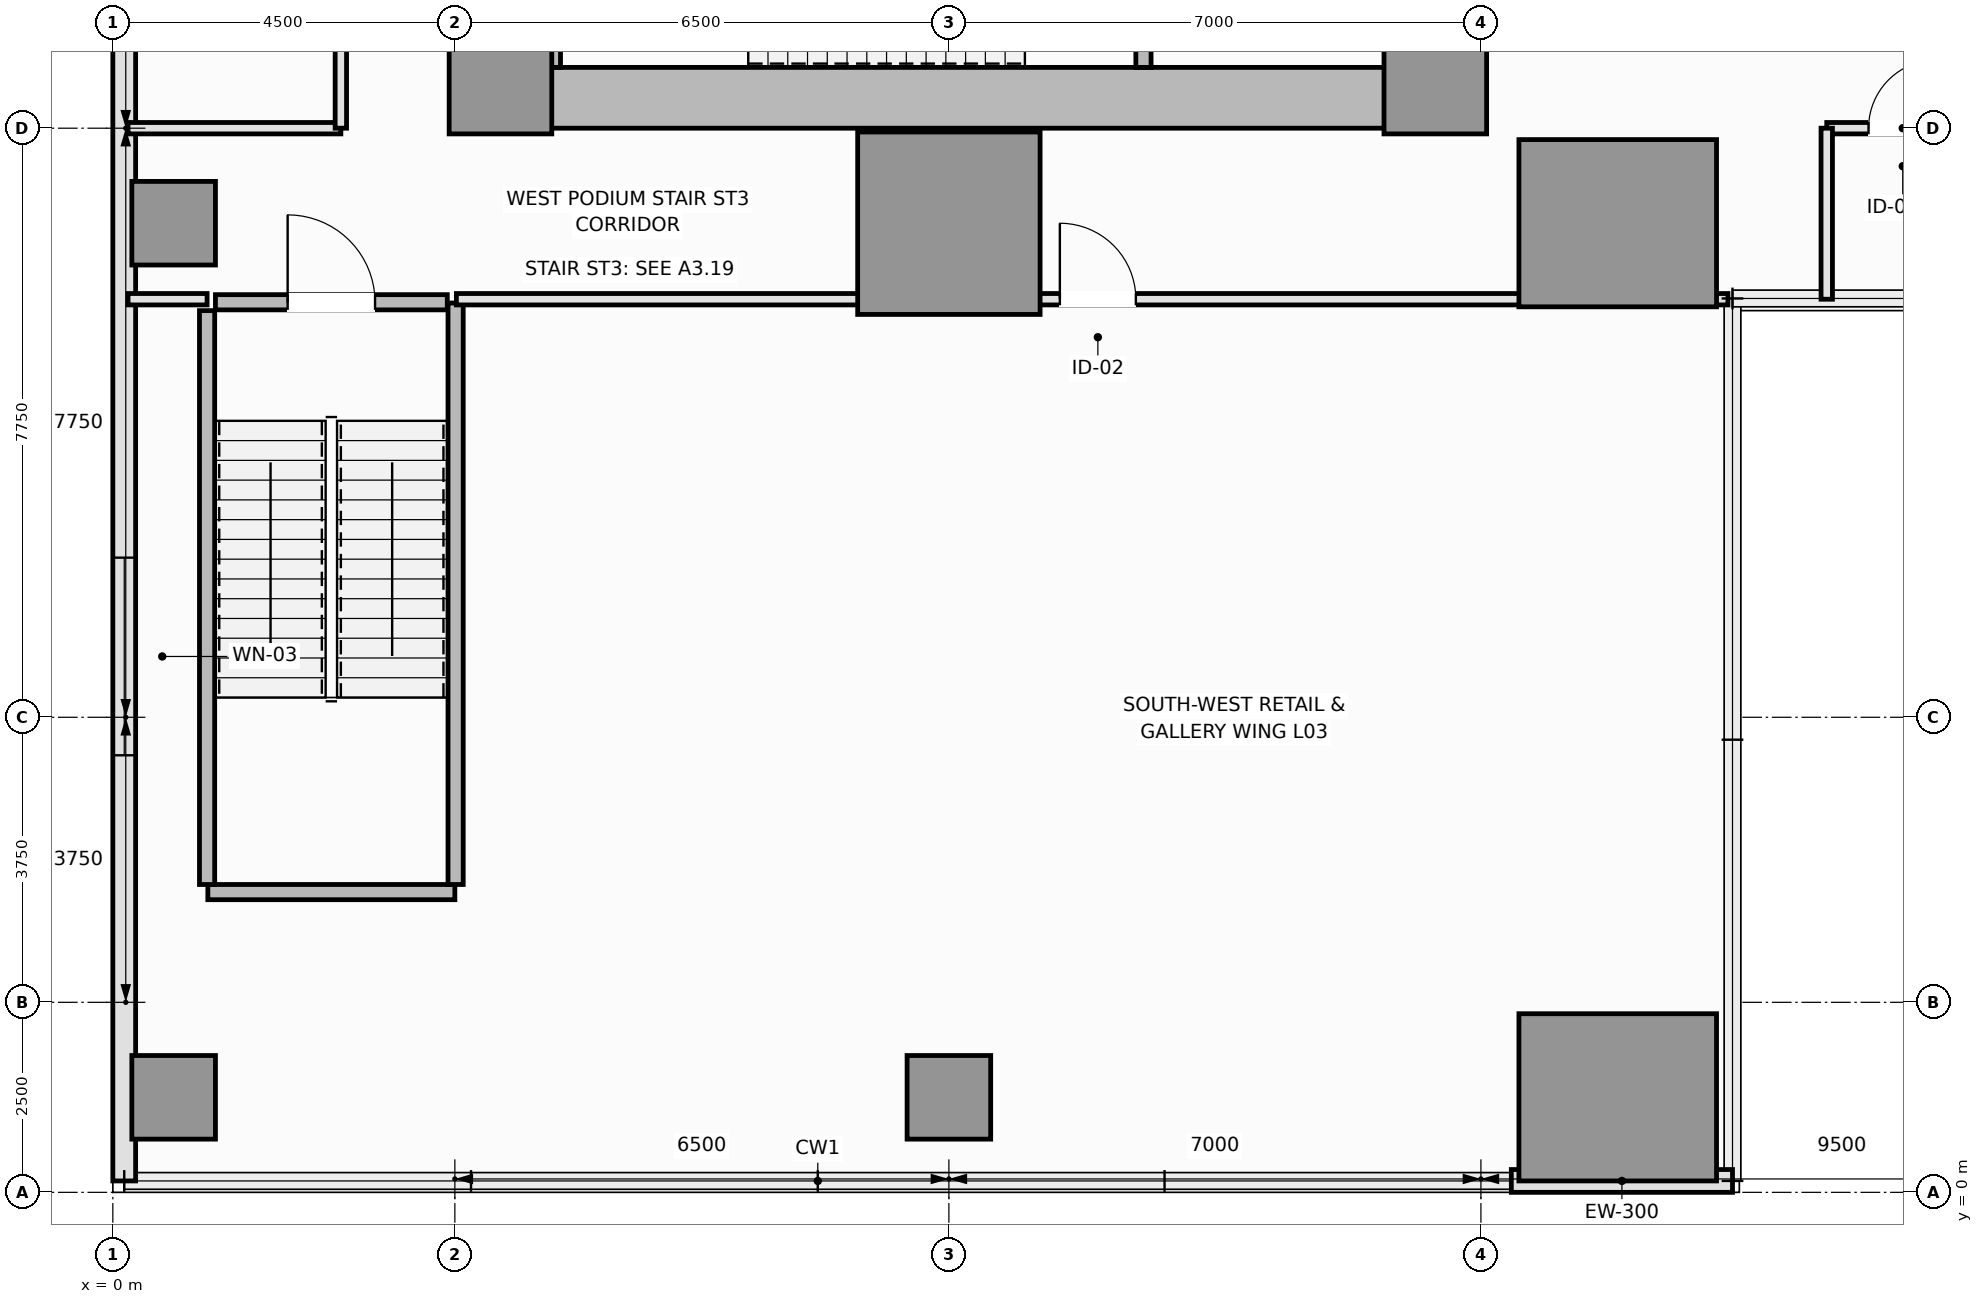
"""IFC4 building model, lengths in metres.
Left out: names, types, materials, properties, quantities, classifications, styles, units other than length and angle.
Written with IfcOpenShell. Run it as: python <this file> out.ifc"""

import sys

from ifc_helpers import new_model, si_unit, direction, frame, frame_2d, origin, origin_2d, place, context, subcontext, project, spatial, rectangle, extrude, element, fill, save


model = new_model("IFC4")
c1 = context("Model", 3, precision=1e-05, world=origin(), true_north=direction((0.0, 1.0)))
c2 = subcontext(c1, "Body", "Model", "MODEL_VIEW")
j1 = project(units=[si_unit("LENGTHUNIT", "METRE"), si_unit("PLANEANGLEUNIT", "RADIAN")], contexts=[c1])
p1 = place(None, origin())
s1 = spatial("IfcSite", under=j1, at=p1, CompositionType="ELEMENT")
p2 = place(p1, origin())
s2 = spatial("IfcBuilding", under=s1, at=p2, CompositionType="ELEMENT")
p3 = place(p2, frame((0.0, 0.0, 15.6)))
s3 = spatial("IfcBuildingStorey", under=s2, at=p3, CompositionType="ELEMENT", Elevation=15.6)
p4 = place(p3, frame((4.5, 14.4, 0.0), z_axis=(0.0, 0.0, 1.0), x_axis=(1.0, 0.0, 0.0)))
e1 = element("IfcWall", 1, at=p4, inside=s3, PredefinedType="SHEAR", context=c2, shape_type="SweptSolid", body=[
    extrude(rectangle(XDim=13.5, YDim=0.8, at=frame_2d((6.75, 0.0))), origin(), (0.0, 0.0, 1.0), 4.8),
])
p5 = place(p3, frame((4.9, 14.8, 0.0), z_axis=(0.0, 0.0, 1.0), x_axis=(0.0, 1.0, 0.0)))
e2 = element("IfcWall", 2, at=p5, inside=s3, PredefinedType="SHEAR", context=c2, shape_type="SweptSolid", body=[
    extrude(rectangle(XDim=20.9, YDim=0.8, at=frame_2d((10.45, 0.0))), origin(), (0.0, 0.0, 1.0), 4.8),
])
p6 = place(p3, frame((17.6, 14.8, 0.0), z_axis=(0.0, 0.0, 1.0), x_axis=(0.0, 1.0, 0.0)))
e3 = element("IfcWall", 3, at=p6, inside=s3, PredefinedType="SHEAR", context=c2, shape_type="SweptSolid", body=[
    extrude(rectangle(XDim=8.65, YDim=0.8, at=frame_2d((4.325, 0.0))), origin(), (0.0, 0.0, 1.0), 4.8),
])
p7 = place(p6, frame((4.1, 0.0, 0.0)))
e4 = element("IfcOpeningElement", 4, at=p7, cuts=e3, PredefinedType="OPENING", context=c2, shape_type="SweptSolid", body=[
    extrude(rectangle(XDim=1.1, YDim=2.15, at=frame_2d((0.55, 1.075))), frame((0.0, 0.41, 0.0), z_axis=(0.0, -1.0, 0.0), x_axis=(1.0, 0.0, 0.0)), (0.0, 0.0, 1.0), 0.82),
])
for number, where, z_axis, x_axis in (
    (5, (5.1, 14.6, 0.0), (0.0, 0.0, 1.0), (1.0, 0.0, 0.0)),
    (6, (17.4, 14.6, 0.0), (0.0, 0.0, 1.0), (1.0, 0.0, 0.0)),
):
    element("IfcColumn", number, at=place(p3, frame(where, z_axis=z_axis, x_axis=x_axis)), inside=s3, PredefinedType="PILASTER", context=c2, shape_type="SweptSolid", body=[
        extrude(rectangle(XDim=1.35, YDim=1.35, at=origin_2d()), origin(), (0.0, 0.0, 1.0), 4.8),
    ])
p8 = place(p3, frame((11.0, 12.75, 0.0), z_axis=(0.0, 0.0, 1.0), x_axis=(1.0, 0.0, 0.0)))
e7 = element("IfcColumn", 7, at=p8, inside=s3, PredefinedType="COLUMN", context=c2, shape_type="SweptSolid", body=[
    extrude(rectangle(XDim=2.4, YDim=2.4, at=origin_2d()), origin(), (0.0, 0.0, 1.0), 4.8),
])
for number, where, z_axis, x_axis in (
    (8, (19.8, 1.25, 0.0), (0.0, 0.0, 1.0), (1.0, 0.0, 0.0)),
    (9, (19.8, 12.75, 0.0), (0.0, 0.0, 1.0), (1.0, 0.0, 0.0)),
):
    element("IfcColumn", number, at=place(p3, frame(where, z_axis=z_axis, x_axis=x_axis)), inside=s3, PredefinedType="COLUMN", context=c2, shape_type="SweptSolid", body=[
        extrude(rectangle(XDim=2.6, YDim=2.2, at=origin_2d()), origin(), (0.0, 0.0, 1.0), 4.8),
    ])
for number, where, z_axis, x_axis in (
    (10, (0.8, 1.25, 0.0), (0.0, 0.0, 1.0), (1.0, 0.0, 0.0)),
    (11, (0.8, 12.75, 0.0), (0.0, 0.0, 1.0), (1.0, 0.0, 0.0)),
    (12, (11.0, 1.25, 0.0), (0.0, 0.0, 1.0), (1.0, 0.0, 0.0)),
):
    element("IfcColumn", number, at=place(p3, frame(where, z_axis=z_axis, x_axis=x_axis)), inside=s3, PredefinedType="COLUMN", context=c2, shape_type="SweptSolid", body=[
        extrude(rectangle(XDim=1.1, YDim=1.1, at=origin_2d()), origin(), (0.0, 0.0, 1.0), 4.8),
    ])
p9 = place(p3, frame((0.15, 50.35, 0.0), z_axis=(0.0, 0.0, 1.0), x_axis=(0.0, -1.0, 0.0)))
e13 = element("IfcWall", 13, at=p9, inside=s3, PredefinedType="SOLIDWALL", context=c2, shape_type="SweptSolid", body=[
    extrude(rectangle(XDim=50.2, YDim=0.3, at=frame_2d((25.1, 0.0))), origin(), (0.0, 0.0, 1.0), 4.6),
])
p10 = place(p9, frame((6.5, 0.0, 0.9)))
e14 = element("IfcOpeningElement", 14, at=p10, cuts=e13, PredefinedType="OPENING", context=c2, shape_type="SweptSolid", body=[
    extrude(rectangle(XDim=2.6, YDim=2.2, at=frame_2d((1.3, 1.1))), frame((0.0, 0.16, 0.0), z_axis=(0.0, -1.0, 0.0), x_axis=(1.0, 0.0, 0.0)), (0.0, 0.0, 1.0), 0.32),
])
p11 = place(p9, frame((42.0, 0.0, 0.9)))
e15 = element("IfcOpeningElement", 15, at=p11, cuts=e13, PredefinedType="OPENING", context=c2, shape_type="SweptSolid", body=[
    extrude(rectangle(XDim=2.6, YDim=2.2, at=frame_2d((1.3, 1.1))), frame((0.0, 0.16, 0.0), z_axis=(0.0, -1.0, 0.0), x_axis=(1.0, 0.0, 0.0)), (0.0, 0.0, 1.0), 0.32),
])
p12 = place(p3, frame((18.4, 0.15, 0.0), z_axis=(0.0, 0.0, 1.0), x_axis=(1.0, 0.0, 0.0)))
e16 = element("IfcWall", 16, at=p12, inside=s3, PredefinedType="SOLIDWALL", context=c2, shape_type="SweptSolid", body=[
    extrude(rectangle(XDim=2.91, YDim=0.3, at=frame_2d((1.455, 0.0))), origin(), (0.0, 0.0, 1.0), 4.6),
])
p13 = place(p3, frame((5.79, 14.8, 0.0), z_axis=(0.0, 0.0, 1.0), x_axis=(0.0, 1.0, 0.0)))
e17 = element("IfcWall", 17, at=p13, inside=s3, PredefinedType="SOLIDWALL", context=c2, shape_type="SweptSolid", body=[
    extrude(rectangle(XDim=3.05, YDim=0.2, at=frame_2d((1.525, 0.0))), origin(), (0.0, 0.0, 1.0), 4.8),
])
p14 = place(p3, frame((13.56, 14.8, 0.0), z_axis=(0.0, 0.0, 1.0), x_axis=(0.0, 1.0, 0.0)))
e18 = element("IfcWall", 18, at=p14, inside=s3, PredefinedType="SOLIDWALL", context=c2, shape_type="SweptSolid", body=[
    extrude(rectangle(XDim=3.05, YDim=0.2, at=frame_2d((1.525, 0.0))), origin(), (0.0, 0.0, 1.0), 4.8),
])
p15 = place(p14, frame((0.95, 0.0, 0.0)))
e19 = element("IfcOpeningElement", 19, at=p15, cuts=e18, PredefinedType="OPENING", context=c2, shape_type="SweptSolid", body=[
    extrude(rectangle(XDim=1.15, YDim=2.15, at=frame_2d((0.575, 1.075))), frame((0.0, 0.11, 0.0), z_axis=(0.0, -1.0, 0.0), x_axis=(1.0, 0.0, 0.0)), (0.0, 0.0, 1.0), 0.22),
])
p16 = place(p3, frame((1.25, 3.95, 0.0), z_axis=(0.0, 0.0, 1.0), x_axis=(1.0, 0.0, 0.0)))
e20 = element("IfcWall", 20, at=p16, inside=s3, PredefinedType="SOLIDWALL", context=c2, shape_type="SweptSolid", body=[
    extrude(rectangle(XDim=3.25, YDim=0.2, at=frame_2d((1.625, 0.0))), origin(), (0.0, 0.0, 1.0), 4.8),
])
p17 = place(p3, frame((1.24, 4.05, 0.0), z_axis=(0.0, 0.0, 1.0), x_axis=(0.0, 1.0, 0.0)))
e21 = element("IfcWall", 21, at=p17, inside=s3, PredefinedType="SOLIDWALL", context=c2, shape_type="SweptSolid", body=[
    extrude(rectangle(XDim=7.55, YDim=0.2, at=frame_2d((3.775, 0.0))), origin(), (0.0, 0.0, 1.0), 4.8),
])
p18 = place(p3, frame((4.51, 4.05, 0.0), z_axis=(0.0, 0.0, 1.0), x_axis=(0.0, 1.0, 0.0)))
e22 = element("IfcWall", 22, at=p18, inside=s3, PredefinedType="SOLIDWALL", context=c2, shape_type="SweptSolid", body=[
    extrude(rectangle(XDim=7.65, YDim=0.2, at=frame_2d((3.825, 0.0))), origin(), (0.0, 0.0, 1.0), 4.8),
])
p19 = place(p3, frame((1.35, 11.71, 0.0), z_axis=(0.0, 0.0, 1.0), x_axis=(1.0, 0.0, 0.0)))
e23 = element("IfcWall", 23, at=p19, inside=s3, PredefinedType="SOLIDWALL", context=c2, shape_type="SweptSolid", body=[
    extrude(rectangle(XDim=3.05, YDim=0.2, at=frame_2d((1.525, 0.0))), origin(), (0.0, 0.0, 1.0), 4.8),
])
p20 = place(p19, frame((0.95, 0.0, 0.0)))
e24 = element("IfcOpeningElement", 24, at=p20, cuts=e23, PredefinedType="OPENING", context=c2, shape_type="SweptSolid", body=[
    extrude(rectangle(XDim=1.15, YDim=2.15, at=frame_2d((0.575, 1.075))), frame((0.0, 0.11, 0.0), z_axis=(0.0, -1.0, 0.0), x_axis=(1.0, 0.0, 0.0)), (0.0, 0.0, 1.0), 0.22),
])
p21 = place(p3, frame((22.55, 14.0, 0.0), z_axis=(0.0, 0.0, 1.0), x_axis=(1.0, 0.0, 0.0)))
e25 = element("IfcWall", 25, at=p21, inside=s3, PredefinedType="PARTITIONING", context=c2, shape_type="SweptSolid", body=[
    extrude(rectangle(XDim=2.0, YDim=0.15, at=frame_2d((1.0, 0.0))), origin(), (0.0, 0.0, 1.0), 4.6),
])
p22 = place(p21, frame((0.55, 0.0, 0.0)))
e26 = element("IfcOpeningElement", 26, at=p22, cuts=e25, PredefinedType="OPENING", context=c2, shape_type="SweptSolid", body=[
    extrude(rectangle(XDim=0.9, YDim=2.1, at=frame_2d((0.45, 1.05))), frame((0.0, 0.085, 0.0), z_axis=(0.0, -1.0, 0.0), x_axis=(1.0, 0.0, 0.0)), (0.0, 0.0, 1.0), 0.17),
])
p23 = place(p3, frame((0.2, 11.75, 0.0), z_axis=(0.0, 0.0, 1.0), x_axis=(1.0, 0.0, 0.0)))
e27 = element("IfcWall", 27, at=p23, inside=s3, PredefinedType="PARTITIONING", context=c2, shape_type="SweptSolid", body=[
    extrude(rectangle(XDim=1.04, YDim=0.15, at=frame_2d((0.52, 0.0))), origin(), (0.0, 0.0, 1.0), 4.6),
])
p24 = place(p3, frame((4.52, 11.75, 0.0), z_axis=(0.0, 0.0, 1.0), x_axis=(1.0, 0.0, 0.0)))
e28 = element("IfcWall", 28, at=p24, inside=s3, PredefinedType="PARTITIONING", context=c2, shape_type="SweptSolid", body=[
    extrude(rectangle(XDim=16.73, YDim=0.15, at=frame_2d((8.365, 0.0))), origin(), (0.0, 0.0, 1.0), 4.6),
])
p25 = place(p24, frame((7.94, 0.0, 0.0)))
e29 = element("IfcOpeningElement", 29, at=p25, cuts=e28, PredefinedType="OPENING", context=c2, shape_type="SweptSolid", body=[
    extrude(rectangle(XDim=1.0, YDim=2.15, at=frame_2d((0.5, 1.075))), frame((0.0, 0.085, 0.0), z_axis=(0.0, -1.0, 0.0), x_axis=(1.0, 0.0, 0.0)), (0.0, 0.0, 1.0), 0.17),
])
p26 = place(p3, frame((0.2, 14.0, 0.0), z_axis=(0.0, 0.0, 1.0), x_axis=(1.0, 0.0, 0.0)))
e30 = element("IfcWall", 30, at=p26, inside=s3, PredefinedType="PARTITIONING", context=c2, shape_type="SweptSolid", body=[
    extrude(rectangle(XDim=2.8, YDim=0.15, at=frame_2d((1.4, 0.0))), origin(), (0.0, 0.0, 1.0), 4.6),
])
p27 = place(p3, frame((22.55, 11.75, 0.0), z_axis=(0.0, 0.0, 1.0), x_axis=(0.0, 1.0, 0.0)))
e31 = element("IfcWall", 31, at=p27, inside=s3, PredefinedType="PARTITIONING", context=c2, shape_type="SweptSolid", body=[
    extrude(rectangle(XDim=2.25, YDim=0.15, at=frame_2d((1.125, 0.0))), origin(), (0.0, 0.0, 1.0), 4.6),
])
p28 = place(p3, frame((3.0, 14.0, 0.0), z_axis=(0.0, 0.0, 1.0), x_axis=(0.0, 1.0, 0.0)))
e32 = element("IfcWall", 32, at=p28, inside=s3, PredefinedType="PARTITIONING", context=c2, shape_type="SweptSolid", body=[
    extrude(rectangle(XDim=11.25, YDim=0.15, at=frame_2d((5.625, 0.0))), origin(), (0.0, 0.0, 1.0), 4.6),
])
p29 = place(p28, frame((5.125, 0.0, 0.0)))
e33 = element("IfcOpeningElement", 33, at=p29, cuts=e32, PredefinedType="OPENING", context=c2, shape_type="SweptSolid", body=[
    extrude(rectangle(XDim=1.0, YDim=2.15, at=frame_2d((0.5, 1.075))), frame((0.0, 0.085, 0.0), z_axis=(0.0, -1.0, 0.0), x_axis=(1.0, 0.0, 0.0)), (0.0, 0.0, 1.0), 0.17),
])
p30 = place(p11, origin())
e34 = element("IfcWindow", 34, at=p30, inside=s3, PartitioningType="SINGLE_PANEL", PredefinedType="WINDOW", context=c2, shape_type="SweptSolid", body=[
    extrude(rectangle(XDim=2.6, YDim=2.2, at=frame_2d((1.3, 1.1))), frame((0.0, 0.03, 0.0), z_axis=(0.0, -1.0, 0.0), x_axis=(1.0, 0.0, 0.0)), (0.0, 0.0, 1.0), 0.06),
])
fill(e15, e34)
p31 = place(p20, origin())
e35 = element("IfcDoor", 35, at=p31, inside=s3, OperationType="SINGLE_SWING_LEFT", PredefinedType="DOOR", context=c2, shape_type="SweptSolid", body=[
    extrude(rectangle(XDim=1.15, YDim=2.15, at=frame_2d((0.575, 1.075))), frame((0.0, 0.025, 0.0), z_axis=(0.0, -1.0, 0.0), x_axis=(1.0, 0.0, 0.0)), (0.0, 0.0, 1.0), 0.05),
])
fill(e24, e35)
p32 = place(p22, origin())
e36 = element("IfcDoor", 36, at=p32, inside=s3, OperationType="SINGLE_SWING_RIGHT", PredefinedType="DOOR", context=c2, shape_type="SweptSolid", body=[
    extrude(rectangle(XDim=0.9, YDim=2.1, at=frame_2d((0.45, 1.05))), frame((0.0, 0.025, 0.0), z_axis=(0.0, -1.0, 0.0), x_axis=(1.0, 0.0, 0.0)), (0.0, 0.0, 1.0), 0.05),
])
fill(e26, e36)
p33 = place(p25, origin())
e37 = element("IfcDoor", 37, at=p33, inside=s3, OperationType="SINGLE_SWING_LEFT", PredefinedType="DOOR", context=c2, shape_type="SweptSolid", body=[
    extrude(rectangle(XDim=1.0, YDim=2.15, at=frame_2d((0.5, 1.075))), frame((0.0, 0.025, 0.0), z_axis=(0.0, -1.0, 0.0), x_axis=(1.0, 0.0, 0.0)), (0.0, 0.0, 1.0), 0.05),
])
fill(e29, e37)
save(model, sys.argv[1])
